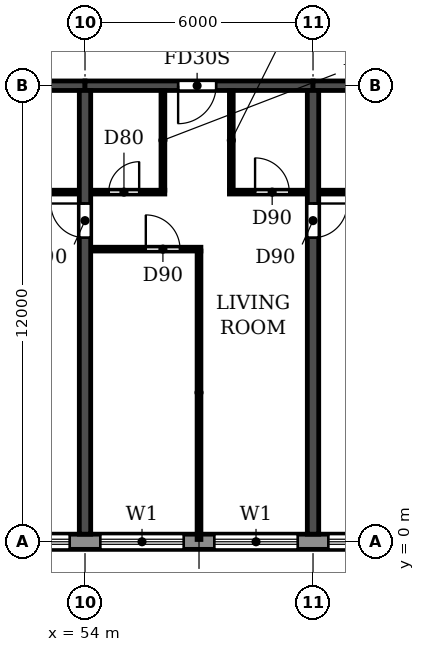
"""IFC4 building model, lengths in metres.
Left out: names, types, materials, properties, quantities, classifications, styles, units other than length and angle.
Written with IfcOpenShell. Run it as: python <this file> out.ifc"""

import sys

from ifc_helpers import new_model, si_unit, direction, frame, frame_2d, origin, place, context, subcontext, project, spatial, rectangle, extrude, element, fill, save


model = new_model("IFC4")
c1 = context("Model", 3, precision=1e-05, world=origin(), true_north=direction((0.0, 1.0)))
c2 = subcontext(c1, "Body", "Model", "MODEL_VIEW")
j1 = project(units=[si_unit("LENGTHUNIT", "METRE"), si_unit("PLANEANGLEUNIT", "RADIAN")], contexts=[c1])
p1 = place(None, origin())
s1 = spatial("IfcSite", under=j1, at=p1, CompositionType="ELEMENT")
p2 = place(p1, origin())
s2 = spatial("IfcBuilding", under=s1, at=p2, CompositionType="ELEMENT")
p3 = place(p2, frame((0.0, 0.0, 162.0)))
s3 = spatial("IfcBuildingStorey", under=s2, at=p3, CompositionType="ELEMENT", Elevation=162.0)
p4 = place(p3, frame((54.0, 0.2, 0.0), z_axis=(0.0, 0.0, 1.0), x_axis=(0.0, 1.0, 0.0)))
e1 = element("IfcWall", 1, at=p4, inside=s3, PredefinedType="SHEAR", context=c2, shape_type="SweptSolid", body=[
    extrude(rectangle(XDim=11.675, YDim=0.3, at=frame_2d((5.837, 0.0))), origin(), (0.0, 0.0, 1.0), 2.95),
])
p5 = place(p4, frame((7.8, 0.0, 0.0)))
e2 = element("IfcOpeningElement", 2, at=p5, cuts=e1, PredefinedType="OPENING", context=c2, shape_type="SweptSolid", body=[
    extrude(rectangle(XDim=0.9, YDim=2.1, at=frame_2d((0.45, 1.05))), frame((0.0, 0.16, 0.0), z_axis=(0.0, -1.0, 0.0), x_axis=(1.0, 0.0, 0.0)), (0.0, 0.0, 1.0), 0.32),
])
p6 = place(p3, frame((60.0, 0.2, 0.0), z_axis=(0.0, 0.0, 1.0), x_axis=(0.0, 1.0, 0.0)))
e3 = element("IfcWall", 3, at=p6, inside=s3, PredefinedType="SHEAR", context=c2, shape_type="SweptSolid", body=[
    extrude(rectangle(XDim=11.675, YDim=0.3, at=frame_2d((5.837, 0.0))), origin(), (0.0, 0.0, 1.0), 2.95),
])
p7 = place(p6, frame((7.8, 0.0, 0.0)))
e4 = element("IfcOpeningElement", 4, at=p7, cuts=e3, PredefinedType="OPENING", context=c2, shape_type="SweptSolid", body=[
    extrude(rectangle(XDim=0.9, YDim=2.1, at=frame_2d((0.45, 1.05))), frame((0.0, 0.16, 0.0), z_axis=(0.0, -1.0, 0.0), x_axis=(1.0, 0.0, 0.0)), (0.0, 0.0, 1.0), 0.32),
])
p8 = place(p3, frame((48.0, 12.0, 0.0), z_axis=(0.0, 0.0, 1.0), x_axis=(1.0, 0.0, 0.0)))
e5 = element("IfcWall", 5, at=p8, inside=s3, PredefinedType="SHEAR", context=c2, shape_type="SweptSolid", body=[
    extrude(rectangle(XDim=6.0, YDim=0.25, at=frame_2d((3.0, 0.0))), origin(), (0.0, 0.0, 1.0), 2.35),
])
p9 = place(p3, frame((54.0, 12.0, 0.0), z_axis=(0.0, 0.0, 1.0), x_axis=(1.0, 0.0, 0.0)))
e6 = element("IfcWall", 6, at=p9, inside=s3, PredefinedType="SHEAR", context=c2, shape_type="SweptSolid", body=[
    extrude(rectangle(XDim=6.0, YDim=0.25, at=frame_2d((3.0, 0.0))), origin(), (0.0, 0.0, 1.0), 2.35),
])
p10 = place(p9, frame((2.45, 0.0, 0.0)))
e7 = element("IfcOpeningElement", 7, at=p10, cuts=e6, PredefinedType="OPENING", context=c2, shape_type="SweptSolid", body=[
    extrude(rectangle(XDim=1.0, YDim=2.1, at=frame_2d((0.5, 1.05))), frame((0.0, 0.135, 0.0), z_axis=(0.0, -1.0, 0.0), x_axis=(1.0, 0.0, 0.0)), (0.0, 0.0, 1.0), 0.27),
])
p11 = place(p3, frame((60.0, 12.0, 0.0), z_axis=(0.0, 0.0, 1.0), x_axis=(1.0, 0.0, 0.0)))
e8 = element("IfcWall", 8, at=p11, inside=s3, PredefinedType="SHEAR", context=c2, shape_type="SweptSolid", body=[
    extrude(rectangle(XDim=6.0, YDim=0.25, at=frame_2d((3.0, 0.0))), origin(), (0.0, 0.0, 1.0), 2.35),
])
p12 = place(p3, frame((22.683, 0.0, 0.0), z_axis=(0.0, 0.0, 1.0), x_axis=(1.0, 0.0, 0.0)))
e9 = element("IfcWall", 9, at=p12, inside=s3, PredefinedType="STANDARD", context=c2, shape_type="SweptSolid", body=[
    extrude(rectangle(XDim=56.634, YDim=0.4, at=frame_2d((28.317, 0.0))), origin(), (0.0, 0.0, 1.0), 2.95),
])
p13 = place(p12, frame((1.717, 0.0, 0.9)))
e10 = element("IfcOpeningElement", 10, at=p13, cuts=e9, PredefinedType="OPENING", context=c2, shape_type="SweptSolid", body=[
    extrude(rectangle(XDim=2.2, YDim=1.5, at=frame_2d((1.1, 0.75))), frame((0.0, 0.21, 0.0), z_axis=(0.0, -1.0, 0.0), x_axis=(1.0, 0.0, 0.0)), (0.0, 0.0, 1.0), 0.42),
])
p14 = place(p12, frame((4.917, 0.0, 0.0)))
e11 = element("IfcOpeningElement", 11, at=p14, cuts=e9, PredefinedType="OPENING", context=c2, shape_type="SweptSolid", body=[
    extrude(rectangle(XDim=1.8, YDim=2.4, at=frame_2d((0.9, 1.2))), frame((0.0, 0.21, 0.0), z_axis=(0.0, -1.0, 0.0), x_axis=(1.0, 0.0, 0.0)), (0.0, 0.0, 1.0), 0.42),
])
p15 = place(p12, frame((7.717, 0.0, 0.9)))
e12 = element("IfcOpeningElement", 12, at=p15, cuts=e9, PredefinedType="OPENING", context=c2, shape_type="SweptSolid", body=[
    extrude(rectangle(XDim=2.2, YDim=1.5, at=frame_2d((1.1, 0.75))), frame((0.0, 0.21, 0.0), z_axis=(0.0, -1.0, 0.0), x_axis=(1.0, 0.0, 0.0)), (0.0, 0.0, 1.0), 0.42),
])
p16 = place(p12, frame((10.717, 0.0, 0.9)))
e13 = element("IfcOpeningElement", 13, at=p16, cuts=e9, PredefinedType="OPENING", context=c2, shape_type="SweptSolid", body=[
    extrude(rectangle(XDim=2.2, YDim=1.5, at=frame_2d((1.1, 0.75))), frame((0.0, 0.21, 0.0), z_axis=(0.0, -1.0, 0.0), x_axis=(1.0, 0.0, 0.0)), (0.0, 0.0, 1.0), 0.42),
])
p17 = place(p12, frame((13.717, 0.0, 0.9)))
e14 = element("IfcOpeningElement", 14, at=p17, cuts=e9, PredefinedType="OPENING", context=c2, shape_type="SweptSolid", body=[
    extrude(rectangle(XDim=2.2, YDim=1.5, at=frame_2d((1.1, 0.75))), frame((0.0, 0.21, 0.0), z_axis=(0.0, -1.0, 0.0), x_axis=(1.0, 0.0, 0.0)), (0.0, 0.0, 1.0), 0.42),
])
p18 = place(p12, frame((16.917, 0.0, 0.0)))
e15 = element("IfcOpeningElement", 15, at=p18, cuts=e9, PredefinedType="OPENING", context=c2, shape_type="SweptSolid", body=[
    extrude(rectangle(XDim=1.8, YDim=2.4, at=frame_2d((0.9, 1.2))), frame((0.0, 0.21, 0.0), z_axis=(0.0, -1.0, 0.0), x_axis=(1.0, 0.0, 0.0)), (0.0, 0.0, 1.0), 0.42),
])
p19 = place(p12, frame((19.717, 0.0, 0.9)))
e16 = element("IfcOpeningElement", 16, at=p19, cuts=e9, PredefinedType="OPENING", context=c2, shape_type="SweptSolid", body=[
    extrude(rectangle(XDim=2.2, YDim=1.5, at=frame_2d((1.1, 0.75))), frame((0.0, 0.21, 0.0), z_axis=(0.0, -1.0, 0.0), x_axis=(1.0, 0.0, 0.0)), (0.0, 0.0, 1.0), 0.42),
])
p20 = place(p12, frame((22.717, 0.0, 0.9)))
e17 = element("IfcOpeningElement", 17, at=p20, cuts=e9, PredefinedType="OPENING", context=c2, shape_type="SweptSolid", body=[
    extrude(rectangle(XDim=2.2, YDim=1.5, at=frame_2d((1.1, 0.75))), frame((0.0, 0.21, 0.0), z_axis=(0.0, -1.0, 0.0), x_axis=(1.0, 0.0, 0.0)), (0.0, 0.0, 1.0), 0.42),
])
p21 = place(p12, frame((25.717, 0.0, 0.9)))
e18 = element("IfcOpeningElement", 18, at=p21, cuts=e9, PredefinedType="OPENING", context=c2, shape_type="SweptSolid", body=[
    extrude(rectangle(XDim=2.2, YDim=1.5, at=frame_2d((1.1, 0.75))), frame((0.0, 0.21, 0.0), z_axis=(0.0, -1.0, 0.0), x_axis=(1.0, 0.0, 0.0)), (0.0, 0.0, 1.0), 0.42),
])
p22 = place(p12, frame((28.717, 0.0, 0.9)))
e19 = element("IfcOpeningElement", 19, at=p22, cuts=e9, PredefinedType="OPENING", context=c2, shape_type="SweptSolid", body=[
    extrude(rectangle(XDim=2.2, YDim=1.5, at=frame_2d((1.1, 0.75))), frame((0.0, 0.21, 0.0), z_axis=(0.0, -1.0, 0.0), x_axis=(1.0, 0.0, 0.0)), (0.0, 0.0, 1.0), 0.42),
])
p23 = place(p12, frame((31.717, 0.0, 0.9)))
e20 = element("IfcOpeningElement", 20, at=p23, cuts=e9, PredefinedType="OPENING", context=c2, shape_type="SweptSolid", body=[
    extrude(rectangle(XDim=2.2, YDim=1.5, at=frame_2d((1.1, 0.75))), frame((0.0, 0.21, 0.0), z_axis=(0.0, -1.0, 0.0), x_axis=(1.0, 0.0, 0.0)), (0.0, 0.0, 1.0), 0.42),
])
p24 = place(p12, frame((34.717, 0.0, 0.9)))
e21 = element("IfcOpeningElement", 21, at=p24, cuts=e9, PredefinedType="OPENING", context=c2, shape_type="SweptSolid", body=[
    extrude(rectangle(XDim=2.2, YDim=1.5, at=frame_2d((1.1, 0.75))), frame((0.0, 0.21, 0.0), z_axis=(0.0, -1.0, 0.0), x_axis=(1.0, 0.0, 0.0)), (0.0, 0.0, 1.0), 0.42),
])
p25 = place(p12, frame((37.717, 0.0, 0.9)))
e22 = element("IfcOpeningElement", 22, at=p25, cuts=e9, PredefinedType="OPENING", context=c2, shape_type="SweptSolid", body=[
    extrude(rectangle(XDim=2.2, YDim=1.5, at=frame_2d((1.1, 0.75))), frame((0.0, 0.21, 0.0), z_axis=(0.0, -1.0, 0.0), x_axis=(1.0, 0.0, 0.0)), (0.0, 0.0, 1.0), 0.42),
])
p26 = place(p12, frame((40.717, 0.0, 0.9)))
e23 = element("IfcOpeningElement", 23, at=p26, cuts=e9, PredefinedType="OPENING", context=c2, shape_type="SweptSolid", body=[
    extrude(rectangle(XDim=2.2, YDim=1.5, at=frame_2d((1.1, 0.75))), frame((0.0, 0.21, 0.0), z_axis=(0.0, -1.0, 0.0), x_axis=(1.0, 0.0, 0.0)), (0.0, 0.0, 1.0), 0.42),
])
p27 = place(p12, frame((43.717, 0.0, 0.9)))
e24 = element("IfcOpeningElement", 24, at=p27, cuts=e9, PredefinedType="OPENING", context=c2, shape_type="SweptSolid", body=[
    extrude(rectangle(XDim=2.2, YDim=1.5, at=frame_2d((1.1, 0.75))), frame((0.0, 0.21, 0.0), z_axis=(0.0, -1.0, 0.0), x_axis=(1.0, 0.0, 0.0)), (0.0, 0.0, 1.0), 0.42),
])
p28 = place(p12, frame((46.717, 0.0, 0.9)))
e25 = element("IfcOpeningElement", 25, at=p28, cuts=e9, PredefinedType="OPENING", context=c2, shape_type="SweptSolid", body=[
    extrude(rectangle(XDim=2.2, YDim=1.5, at=frame_2d((1.1, 0.75))), frame((0.0, 0.21, 0.0), z_axis=(0.0, -1.0, 0.0), x_axis=(1.0, 0.0, 0.0)), (0.0, 0.0, 1.0), 0.42),
])
p29 = place(p12, frame((49.917, 0.0, 0.0)))
e26 = element("IfcOpeningElement", 26, at=p29, cuts=e9, PredefinedType="OPENING", context=c2, shape_type="SweptSolid", body=[
    extrude(rectangle(XDim=1.8, YDim=2.4, at=frame_2d((0.9, 1.2))), frame((0.0, 0.21, 0.0), z_axis=(0.0, -1.0, 0.0), x_axis=(1.0, 0.0, 0.0)), (0.0, 0.0, 1.0), 0.42),
])
p30 = place(p12, frame((52.717, 0.0, 0.9)))
e27 = element("IfcOpeningElement", 27, at=p30, cuts=e9, PredefinedType="OPENING", context=c2, shape_type="SweptSolid", body=[
    extrude(rectangle(XDim=2.2, YDim=1.5, at=frame_2d((1.1, 0.75))), frame((0.0, 0.21, 0.0), z_axis=(0.0, -1.0, 0.0), x_axis=(1.0, 0.0, 0.0)), (0.0, 0.0, 1.0), 0.42),
])
p31 = place(p3, frame((54.16, 7.7, 0.0), z_axis=(0.0, 0.0, 1.0), x_axis=(1.0, 0.0, 0.0)))
e28 = element("IfcWall", 28, at=p31, inside=s3, PredefinedType="PARTITIONING", context=c2, shape_type="SweptSolid", body=[
    extrude(rectangle(XDim=2.89, YDim=0.1, at=frame_2d((1.445, 0.0))), origin(), (0.0, 0.0, 1.0), 2.95),
])
p32 = place(p31, frame((1.44, 0.0, 0.0)))
e29 = element("IfcOpeningElement", 29, at=p32, cuts=e28, PredefinedType="OPENING", context=c2, shape_type="SweptSolid", body=[
    extrude(rectangle(XDim=0.9, YDim=2.1, at=frame_2d((0.45, 1.05))), frame((0.0, 0.06, 0.0), z_axis=(0.0, -1.0, 0.0), x_axis=(1.0, 0.0, 0.0)), (0.0, 0.0, 1.0), 0.12),
])
p33 = place(p3, frame((51.1, 9.2, 0.0), z_axis=(0.0, 0.0, 1.0), x_axis=(1.0, 0.0, 0.0)))
e30 = element("IfcWall", 30, at=p33, inside=s3, PredefinedType="PARTITIONING", context=c2, shape_type="SweptSolid", body=[
    extrude(rectangle(XDim=2.74, YDim=0.1, at=frame_2d((1.37, 0.0))), origin(), (0.0, 0.0, 1.0), 2.95),
])
p34 = place(p33, frame((1.0, 0.0, 0.0)))
e31 = element("IfcOpeningElement", 31, at=p34, cuts=e30, PredefinedType="OPENING", context=c2, shape_type="SweptSolid", body=[
    extrude(rectangle(XDim=0.8, YDim=2.1, at=frame_2d((0.4, 1.05))), frame((0.0, 0.06, 0.0), z_axis=(0.0, -1.0, 0.0), x_axis=(1.0, 0.0, 0.0)), (0.0, 0.0, 1.0), 0.12),
])
p35 = place(p3, frame((54.16, 9.2, 0.0), z_axis=(0.0, 0.0, 1.0), x_axis=(1.0, 0.0, 0.0)))
e32 = element("IfcWall", 32, at=p35, inside=s3, PredefinedType="PARTITIONING", context=c2, shape_type="SweptSolid", body=[
    extrude(rectangle(XDim=1.94, YDim=0.1, at=frame_2d((0.97, 0.0))), origin(), (0.0, 0.0, 1.0), 2.95),
])
p36 = place(p35, frame((0.465, 0.0, 0.0)))
e33 = element("IfcOpeningElement", 33, at=p36, cuts=e32, PredefinedType="OPENING", context=c2, shape_type="SweptSolid", body=[
    extrude(rectangle(XDim=0.8, YDim=2.1, at=frame_2d((0.4, 1.05))), frame((0.0, 0.06, 0.0), z_axis=(0.0, -1.0, 0.0), x_axis=(1.0, 0.0, 0.0)), (0.0, 0.0, 1.0), 0.12),
])
p37 = place(p3, frame((57.8, 9.2, 0.0), z_axis=(0.0, 0.0, 1.0), x_axis=(1.0, 0.0, 0.0)))
e34 = element("IfcWall", 34, at=p37, inside=s3, PredefinedType="PARTITIONING", context=c2, shape_type="SweptSolid", body=[
    extrude(rectangle(XDim=2.04, YDim=0.1, at=frame_2d((1.02, 0.0))), origin(), (0.0, 0.0, 1.0), 2.95),
])
p38 = place(p37, frame((0.675, 0.0, 0.0)))
e35 = element("IfcOpeningElement", 35, at=p38, cuts=e34, PredefinedType="OPENING", context=c2, shape_type="SweptSolid", body=[
    extrude(rectangle(XDim=0.9, YDim=2.1, at=frame_2d((0.45, 1.05))), frame((0.0, 0.06, 0.0), z_axis=(0.0, -1.0, 0.0), x_axis=(1.0, 0.0, 0.0)), (0.0, 0.0, 1.0), 0.12),
])
p39 = place(p3, frame((60.16, 9.2, 0.0), z_axis=(0.0, 0.0, 1.0), x_axis=(1.0, 0.0, 0.0)))
e36 = element("IfcWall", 36, at=p39, inside=s3, PredefinedType="PARTITIONING", context=c2, shape_type="SweptSolid", body=[
    extrude(rectangle(XDim=2.74, YDim=0.1, at=frame_2d((1.37, 0.0))), origin(), (0.0, 0.0, 1.0), 2.95),
])
p40 = place(p39, frame((0.94, 0.0, 0.0)))
e37 = element("IfcOpeningElement", 37, at=p40, cuts=e36, PredefinedType="OPENING", context=c2, shape_type="SweptSolid", body=[
    extrude(rectangle(XDim=0.8, YDim=2.1, at=frame_2d((0.4, 1.05))), frame((0.0, 0.06, 0.0), z_axis=(0.0, -1.0, 0.0), x_axis=(1.0, 0.0, 0.0)), (0.0, 0.0, 1.0), 0.12),
])
p41 = place(p3, frame((56.05, 9.25, 0.0), z_axis=(0.0, 0.0, 1.0), x_axis=(0.0, 1.0, 0.0)))
e38 = element("IfcWall", 38, at=p41, inside=s3, PredefinedType="PARTITIONING", context=c2, shape_type="SweptSolid", body=[
    extrude(rectangle(XDim=2.615, YDim=0.1, at=frame_2d((1.308, 0.0))), origin(), (0.0, 0.0, 1.0), 2.95),
])
p42 = place(p3, frame((57.0, 0.06, 0.0), z_axis=(0.0, 0.0, 1.0), x_axis=(0.0, 1.0, 0.0)))
e39 = element("IfcWall", 39, at=p42, inside=s3, PredefinedType="PARTITIONING", context=c2, shape_type="SweptSolid", body=[
    extrude(rectangle(XDim=7.59, YDim=0.1, at=frame_2d((3.795, 0.0))), origin(), (0.0, 0.0, 1.0), 2.95),
])
p43 = place(p3, frame((57.85, 9.25, 0.0), z_axis=(0.0, 0.0, 1.0), x_axis=(0.0, 1.0, 0.0)))
e40 = element("IfcWall", 40, at=p43, inside=s3, PredefinedType="PARTITIONING", context=c2, shape_type="SweptSolid", body=[
    extrude(rectangle(XDim=2.615, YDim=0.1, at=frame_2d((1.308, 0.0))), origin(), (0.0, 0.0, 1.0), 2.95),
])
p44 = place(p22, origin())
e41 = element("IfcWindow", 41, at=p44, inside=s3, PartitioningType="DOUBLE_PANEL_HORIZONTAL", PredefinedType="WINDOW", context=c2, shape_type="SweptSolid", body=[
    extrude(rectangle(XDim=2.2, YDim=1.5, at=frame_2d((1.1, 0.75))), frame((0.0, 0.03, 0.0), z_axis=(0.0, -1.0, 0.0), x_axis=(1.0, 0.0, 0.0)), (0.0, 0.0, 1.0), 0.06),
])
fill(e19, e41)
p45 = place(p23, origin())
e42 = element("IfcWindow", 42, at=p45, inside=s3, PartitioningType="DOUBLE_PANEL_HORIZONTAL", PredefinedType="WINDOW", context=c2, shape_type="SweptSolid", body=[
    extrude(rectangle(XDim=2.2, YDim=1.5, at=frame_2d((1.1, 0.75))), frame((0.0, 0.03, 0.0), z_axis=(0.0, -1.0, 0.0), x_axis=(1.0, 0.0, 0.0)), (0.0, 0.0, 1.0), 0.06),
])
fill(e20, e42)
p46 = place(p24, origin())
e43 = element("IfcWindow", 43, at=p46, inside=s3, PartitioningType="DOUBLE_PANEL_HORIZONTAL", PredefinedType="WINDOW", context=c2, shape_type="SweptSolid", body=[
    extrude(rectangle(XDim=2.2, YDim=1.5, at=frame_2d((1.1, 0.75))), frame((0.0, 0.03, 0.0), z_axis=(0.0, -1.0, 0.0), x_axis=(1.0, 0.0, 0.0)), (0.0, 0.0, 1.0), 0.06),
])
fill(e21, e43)
p47 = place(p25, origin())
e44 = element("IfcWindow", 44, at=p47, inside=s3, PartitioningType="DOUBLE_PANEL_HORIZONTAL", PredefinedType="WINDOW", context=c2, shape_type="SweptSolid", body=[
    extrude(rectangle(XDim=2.2, YDim=1.5, at=frame_2d((1.1, 0.75))), frame((0.0, 0.03, 0.0), z_axis=(0.0, -1.0, 0.0), x_axis=(1.0, 0.0, 0.0)), (0.0, 0.0, 1.0), 0.06),
])
fill(e22, e44)
p48 = place(p5, origin())
e45 = element("IfcDoor", 45, at=p48, inside=s3, OperationType="SINGLE_SWING_RIGHT", PredefinedType="DOOR", context=c2, shape_type="SweptSolid", body=[
    extrude(rectangle(XDim=0.9, YDim=2.1, at=frame_2d((0.45, 1.05))), frame((0.0, 0.025, 0.0), z_axis=(0.0, -1.0, 0.0), x_axis=(1.0, 0.0, 0.0)), (0.0, 0.0, 1.0), 0.05),
])
fill(e2, e45)
p49 = place(p36, origin())
e46 = element("IfcDoor", 46, at=p49, inside=s3, OperationType="SINGLE_SWING_RIGHT", PredefinedType="DOOR", context=c2, shape_type="SweptSolid", body=[
    extrude(rectangle(XDim=0.8, YDim=2.1, at=frame_2d((0.4, 1.05))), frame((0.0, 0.025, 0.0), z_axis=(0.0, -1.0, 0.0), x_axis=(1.0, 0.0, 0.0)), (0.0, 0.0, 1.0), 0.05),
])
fill(e33, e46)
p50 = place(p32, origin())
e47 = element("IfcDoor", 47, at=p50, inside=s3, OperationType="SINGLE_SWING_LEFT", PredefinedType="DOOR", context=c2, shape_type="SweptSolid", body=[
    extrude(rectangle(XDim=0.9, YDim=2.1, at=frame_2d((0.45, 1.05))), frame((0.0, 0.025, 0.0), z_axis=(0.0, -1.0, 0.0), x_axis=(1.0, 0.0, 0.0)), (0.0, 0.0, 1.0), 0.05),
])
fill(e29, e47)
p51 = place(p10, frame((1.0, 0.0, 0.0), z_axis=(0.0, 0.0, 1.0), x_axis=(-1.0, 0.0, 0.0)))
e48 = element("IfcDoor", 48, at=p51, inside=s3, OperationType="SINGLE_SWING_RIGHT", PredefinedType="DOOR", context=c2, shape_type="SweptSolid", body=[
    extrude(rectangle(XDim=1.0, YDim=2.1, at=frame_2d((0.5, 1.05))), frame((0.0, 0.025, 0.0), z_axis=(0.0, -1.0, 0.0), x_axis=(1.0, 0.0, 0.0)), (0.0, 0.0, 1.0), 0.05),
])
fill(e7, e48)
p52 = place(p38, origin())
e49 = element("IfcDoor", 49, at=p52, inside=s3, OperationType="SINGLE_SWING_LEFT", PredefinedType="DOOR", context=c2, shape_type="SweptSolid", body=[
    extrude(rectangle(XDim=0.9, YDim=2.1, at=frame_2d((0.45, 1.05))), frame((0.0, 0.025, 0.0), z_axis=(0.0, -1.0, 0.0), x_axis=(1.0, 0.0, 0.0)), (0.0, 0.0, 1.0), 0.05),
])
fill(e35, e49)
p53 = place(p7, frame((0.9, 0.0, 0.0), z_axis=(0.0, 0.0, 1.0), x_axis=(-1.0, 0.0, 0.0)))
e50 = element("IfcDoor", 50, at=p53, inside=s3, OperationType="SINGLE_SWING_LEFT", PredefinedType="DOOR", context=c2, shape_type="SweptSolid", body=[
    extrude(rectangle(XDim=0.9, YDim=2.1, at=frame_2d((0.45, 1.05))), frame((0.0, 0.025, 0.0), z_axis=(0.0, -1.0, 0.0), x_axis=(1.0, 0.0, 0.0)), (0.0, 0.0, 1.0), 0.05),
])
fill(e4, e50)
save(model, sys.argv[1])
